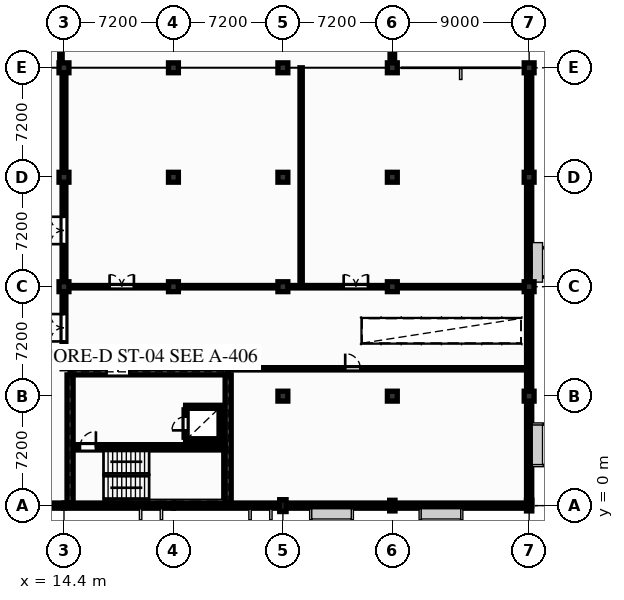
"""IFC4 building model, lengths in metres.
Left out: names, types, materials, properties, quantities, classifications, styles, units other than length and angle.
Written with IfcOpenShell. Run it as: python <this file> out.ifc"""

import sys

from ifc_helpers import new_model, si_unit, direction, frame, frame_2d, origin, origin_2d, place, context, subcontext, project, spatial, rectangle, extrude, element, fill, save


model = new_model("IFC4")
c1 = context("Model", 3, precision=1e-05, world=origin(), true_north=direction((0.0, 1.0)))
c2 = subcontext(c1, "Body", "Model", "MODEL_VIEW")
j1 = project(units=[si_unit("LENGTHUNIT", "METRE"), si_unit("PLANEANGLEUNIT", "RADIAN")], contexts=[c1])
p1 = place(None, origin())
s1 = spatial("IfcSite", under=j1, at=p1, CompositionType="ELEMENT")
p2 = place(p1, origin())
s2 = spatial("IfcBuilding", under=s1, at=p2, CompositionType="ELEMENT")
p3 = place(p2, frame((0.0, 0.0, 5.1)))
s3 = spatial("IfcBuildingStorey", under=s2, at=p3, CompositionType="ELEMENT", Elevation=5.1)
for number, where, z_axis, x_axis in (
    (1, (14.4, 14.4, 0.0), (0.0, 0.0, 1.0), (1.0, 0.0, 0.0)),
    (2, (14.4, 21.6, 0.0), (0.0, 0.0, 1.0), (1.0, 0.0, 0.0)),
    (3, (14.4, 28.8, 0.0), (0.0, 0.0, 1.0), (1.0, 0.0, 0.0)),
    (4, (21.6, 14.4, 0.0), (0.0, 0.0, 1.0), (1.0, 0.0, 0.0)),
    (5, (21.6, 21.6, 0.0), (0.0, 0.0, 1.0), (1.0, 0.0, 0.0)),
    (6, (21.6, 28.8, 0.0), (0.0, 0.0, 1.0), (1.0, 0.0, 0.0)),
):
    element("IfcColumn", number, at=place(p3, frame(where, z_axis=z_axis, x_axis=x_axis)), inside=s3, PredefinedType="COLUMN", context=c2, shape_type="SweptSolid", body=[
        extrude(rectangle(XDim=0.65, YDim=0.65, at=origin_2d()), origin(), (0.0, 0.0, 1.0), 3.84),
    ])
p4 = place(p3, frame((28.8, 0.0, 0.0), z_axis=(0.0, 0.0, 1.0), x_axis=(0.0, 1.0, 0.0)))
e7 = element("IfcColumn", 7, at=p4, inside=s3, PredefinedType="PILASTER", context=c2, shape_type="SweptSolid", body=[
    extrude(rectangle(XDim=0.42, YDim=0.78, at=origin_2d()), origin(), (0.0, 0.0, 1.0), 3.84),
])
for number, where, z_axis, x_axis in (
    (8, (28.8, 7.2, 0.0), (0.0, 0.0, 1.0), (1.0, 0.0, 0.0)),
    (9, (28.8, 14.4, 0.0), (0.0, 0.0, 1.0), (1.0, 0.0, 0.0)),
    (10, (28.8, 21.6, 0.0), (0.0, 0.0, 1.0), (1.0, 0.0, 0.0)),
    (11, (28.8, 28.8, 0.0), (0.0, 0.0, 1.0), (1.0, 0.0, 0.0)),
):
    element("IfcColumn", number, at=place(p3, frame(where, z_axis=z_axis, x_axis=x_axis)), inside=s3, PredefinedType="COLUMN", context=c2, shape_type="SweptSolid", body=[
        extrude(rectangle(XDim=0.65, YDim=0.65, at=origin_2d()), origin(), (0.0, 0.0, 1.0), 3.84),
    ])
p5 = place(p3, frame((36.0, 0.0, 0.0), z_axis=(0.0, 0.0, 1.0), x_axis=(0.0, 1.0, 0.0)))
e12 = element("IfcColumn", 12, at=p5, inside=s3, PredefinedType="PILASTER", context=c2, shape_type="SweptSolid", body=[
    extrude(rectangle(XDim=0.35, YDim=0.7, at=origin_2d()), origin(), (0.0, 0.0, 1.0), 3.84),
])
for number, where, z_axis, x_axis in (
    (13, (36.0, 7.2, 0.0), (0.0, 0.0, 1.0), (1.0, 0.0, 0.0)),
    (14, (36.0, 14.4, 0.0), (0.0, 0.0, 1.0), (1.0, 0.0, 0.0)),
    (15, (36.0, 21.6, 0.0), (0.0, 0.0, 1.0), (1.0, 0.0, 0.0)),
    (16, (36.0, 28.8, 0.0), (0.0, 0.0, 1.0), (1.0, 0.0, 0.0)),
):
    element("IfcColumn", number, at=place(p3, frame(where, z_axis=z_axis, x_axis=x_axis)), inside=s3, PredefinedType="COLUMN", context=c2, shape_type="SweptSolid", body=[
        extrude(rectangle(XDim=0.65, YDim=0.65, at=origin_2d()), origin(), (0.0, 0.0, 1.0), 3.84),
    ])
p6 = place(p3, frame((45.0, 0.0, 0.0), z_axis=(0.0, 0.0, 1.0), x_axis=(0.0, 1.0, 0.0)))
e17 = element("IfcColumn", 17, at=p6, inside=s3, PredefinedType="PILASTER", context=c2, shape_type="SweptSolid", body=[
    extrude(rectangle(XDim=0.35, YDim=0.7, at=origin_2d()), origin(), (0.0, 0.0, 1.0), 3.84),
])
for number, where, z_axis, x_axis in (
    (18, (45.0, 7.2, 0.0), (0.0, 0.0, 1.0), (1.0, 0.0, 0.0)),
    (19, (45.0, 14.4, 0.0), (0.0, 0.0, 1.0), (1.0, 0.0, 0.0)),
    (20, (45.0, 21.6, 0.0), (0.0, 0.0, 1.0), (1.0, 0.0, 0.0)),
    (21, (45.0, 28.8, 0.0), (0.0, 0.0, 1.0), (1.0, 0.0, 0.0)),
):
    element("IfcColumn", number, at=place(p3, frame(where, z_axis=z_axis, x_axis=x_axis)), inside=s3, PredefinedType="COLUMN", context=c2, shape_type="SweptSolid", body=[
        extrude(rectangle(XDim=0.65, YDim=0.65, at=origin_2d()), origin(), (0.0, 0.0, 1.0), 3.84),
    ])
p7 = place(p3, frame((36.0, 28.8, 0.0), z_axis=(0.0, 0.0, 1.0), x_axis=(0.0, 1.0, 0.0)))
e22 = element("IfcWall", 22, at=p7, inside=s3, PredefinedType="SOLIDWALL", context=c2, shape_type="SweptSolid", body=[
    extrude(rectangle(XDim=7.2, YDim=0.3, at=frame_2d((3.6, 0.0))), origin(), (0.0, 0.0, 1.0), 3.117),
])
p8 = place(p7, frame((1.6, 0.0, 0.85)))
e23 = element("IfcOpeningElement", 23, at=p8, cuts=e22, PredefinedType="OPENING", context=c2, shape_type="SweptSolid", body=[
    extrude(rectangle(XDim=1.95, YDim=2.1, at=frame_2d((0.975, 1.05))), frame((0.0, 0.16, 0.0), z_axis=(0.0, -1.0, 0.0), x_axis=(1.0, 0.0, 0.0)), (0.0, 0.0, 1.0), 0.32),
])
p9 = place(p7, frame((4.5, 0.0, 0.85)))
e24 = element("IfcOpeningElement", 24, at=p9, cuts=e22, PredefinedType="OPENING", context=c2, shape_type="SweptSolid", body=[
    extrude(rectangle(XDim=1.6, YDim=2.05, at=frame_2d((0.8, 1.025))), frame((0.0, 0.16, 0.0), z_axis=(0.0, -1.0, 0.0), x_axis=(1.0, 0.0, 0.0)), (0.0, 0.0, 1.0), 0.32),
])
p10 = place(p3, frame((7.2, 0.0, 0.0), z_axis=(0.0, 0.0, 1.0), x_axis=(1.0, 0.0, 0.0)))
e25 = element("IfcWall", 25, at=p10, inside=s3, PredefinedType="SOLIDWALL", context=c2, shape_type="SweptSolid", body=[
    extrude(rectangle(XDim=7.2, YDim=0.34, at=frame_2d((3.6, 0.0))), origin(), (0.0, 0.0, 1.0), 3.55),
])
p11 = place(p10, frame((2.0, 0.0, 0.85)))
e26 = element("IfcOpeningElement", 26, at=p11, cuts=e25, PredefinedType="OPENING", context=c2, shape_type="SweptSolid", body=[
    extrude(rectangle(XDim=2.4, YDim=2.4, at=frame_2d((1.2, 1.2))), frame((0.0, 0.18, 0.0), z_axis=(0.0, -1.0, 0.0), x_axis=(1.0, 0.0, 0.0)), (0.0, 0.0, 1.0), 0.36),
])
p12 = place(p3, frame((14.4, 0.0, 0.0), z_axis=(0.0, 0.0, 1.0), x_axis=(1.0, 0.0, 0.0)))
e27 = element("IfcWall", 27, at=p12, inside=s3, PredefinedType="SOLIDWALL", context=c2, shape_type="SweptSolid", body=[
    extrude(rectangle(XDim=7.2, YDim=0.34, at=frame_2d((3.6, 0.0))), origin(), (0.0, 0.0, 1.0), 3.55),
])
p13 = place(p12, frame((5.2, 0.0, 1.05)))
e28 = element("IfcOpeningElement", 28, at=p13, cuts=e27, PredefinedType="OPENING", context=c2, shape_type="SweptSolid", body=[
    extrude(rectangle(XDim=1.05, YDim=1.75, at=frame_2d((0.525, 0.875))), frame((0.0, 0.18, 0.0), z_axis=(0.0, -1.0, 0.0), x_axis=(1.0, 0.0, 0.0)), (0.0, 0.0, 1.0), 0.36),
])
p14 = place(p3, frame((21.6, 0.0, 0.0), z_axis=(0.0, 0.0, 1.0), x_axis=(1.0, 0.0, 0.0)))
e29 = element("IfcWall", 29, at=p14, inside=s3, PredefinedType="SOLIDWALL", context=c2, shape_type="SweptSolid", body=[
    extrude(rectangle(XDim=7.2, YDim=0.34, at=frame_2d((3.6, 0.0))), origin(), (0.0, 0.0, 1.0), 3.55),
])
p15 = place(p14, frame((5.2, 0.0, 1.05)))
e30 = element("IfcOpeningElement", 30, at=p15, cuts=e29, PredefinedType="OPENING", context=c2, shape_type="SweptSolid", body=[
    extrude(rectangle(XDim=1.05, YDim=1.75, at=frame_2d((0.525, 0.875))), frame((0.0, 0.18, 0.0), z_axis=(0.0, -1.0, 0.0), x_axis=(1.0, 0.0, 0.0)), (0.0, 0.0, 1.0), 0.36),
])
p16 = place(p3, frame((28.8, 0.0, 0.0), z_axis=(0.0, 0.0, 1.0), x_axis=(1.0, 0.0, 0.0)))
e31 = element("IfcWall", 31, at=p16, inside=s3, PredefinedType="SOLIDWALL", context=c2, shape_type="SweptSolid", body=[
    extrude(rectangle(XDim=7.2, YDim=0.34, at=frame_2d((3.6, 0.0))), origin(), (0.0, 0.0, 1.0), 3.55),
])
p17 = place(p16, frame((2.0, 0.0, 0.435)))
e32 = element("IfcOpeningElement", 32, at=p17, cuts=e31, PredefinedType="OPENING", context=c2, shape_type="SweptSolid", body=[
    extrude(rectangle(XDim=2.4, YDim=2.4, at=frame_2d((1.2, 1.2))), frame((0.0, 0.18, 0.0), z_axis=(0.0, -1.0, 0.0), x_axis=(1.0, 0.0, 0.0)), (0.0, 0.0, 1.0), 0.36),
])
p18 = place(p3, frame((36.0, 0.0, 0.0), z_axis=(0.0, 0.0, 1.0), x_axis=(1.0, 0.0, 0.0)))
e33 = element("IfcWall", 33, at=p18, inside=s3, PredefinedType="SOLIDWALL", context=c2, shape_type="SweptSolid", body=[
    extrude(rectangle(XDim=9.0, YDim=0.34, at=frame_2d((4.5, 0.0))), origin(), (0.0, 0.0, 1.0), 3.55),
])
p19 = place(p18, frame((2.0, 0.0, 0.375)))
e34 = element("IfcOpeningElement", 34, at=p19, cuts=e33, PredefinedType="OPENING", context=c2, shape_type="SweptSolid", body=[
    extrude(rectangle(XDim=2.4, YDim=2.4, at=frame_2d((1.2, 1.2))), frame((0.0, 0.18, 0.0), z_axis=(0.0, -1.0, 0.0), x_axis=(1.0, 0.0, 0.0)), (0.0, 0.0, 1.0), 0.36),
])
p20 = place(p3, frame((45.0, 0.0, 0.0), z_axis=(0.0, 0.0, 1.0), x_axis=(0.0, 1.0, 0.0)))
e35 = element("IfcWall", 35, at=p20, inside=s3, PredefinedType="SOLIDWALL", context=c2, shape_type="SweptSolid", body=[
    extrude(rectangle(XDim=28.8, YDim=0.34, at=frame_2d((14.4, 0.0))), origin(), (0.0, 0.0, 1.0), 3.55),
])
p21 = place(p20, frame((2.8, 0.0, 0.255)))
e36 = element("IfcOpeningElement", 36, at=p21, cuts=e35, PredefinedType="OPENING", context=c2, shape_type="SweptSolid", body=[
    extrude(rectangle(XDim=2.4, YDim=2.4, at=frame_2d((1.2, 1.2))), frame((0.0, 0.18, 0.0), z_axis=(0.0, -1.0, 0.0), x_axis=(1.0, 0.0, 0.0)), (0.0, 0.0, 1.0), 0.36),
])
p22 = place(p20, frame((15.2, 0.0, 0.605)))
e37 = element("IfcOpeningElement", 37, at=p22, cuts=e35, PredefinedType="OPENING", context=c2, shape_type="SweptSolid", body=[
    extrude(rectangle(XDim=1.6, YDim=2.05, at=frame_2d((0.8, 1.025))), frame((0.0, 0.18, 0.0), z_axis=(0.0, -1.0, 0.0), x_axis=(1.0, 0.0, 0.0)), (0.0, 0.0, 1.0), 0.36),
])
p23 = place(p3, frame((14.8, 8.8, 0.0), z_axis=(0.0, 0.0, 1.0), x_axis=(1.0, 0.0, 0.0)))
e38 = element("IfcWall", 38, at=p23, inside=s3, PredefinedType="SHEAR", context=c2, shape_type="SweptSolid", body=[
    extrude(rectangle(XDim=10.4, YDim=0.4, at=frame_2d((5.2, 0.0))), origin(), (0.0, 0.0, 1.0), 3.55),
])
p24 = place(p23, frame((2.4, 0.0, 0.0)))
e39 = element("IfcOpeningElement", 39, at=p24, cuts=e38, PredefinedType="OPENING", context=c2, shape_type="SweptSolid", body=[
    extrude(rectangle(XDim=1.5, YDim=2.2, at=frame_2d((0.75, 1.1))), frame((0.0, 0.21, 0.0), z_axis=(0.0, -1.0, 0.0), x_axis=(1.0, 0.0, 0.0)), (0.0, 0.0, 1.0), 0.42),
])
for number, where, z_axis, x_axis in (
    (40, (14.8, 0.17, 0.0), (0.0, 0.0, 1.0), (0.0, 1.0, 0.0)),
    (41, (25.2, 0.17, 0.0), (0.0, 0.0, 1.0), (0.0, 1.0, 0.0)),
):
    element("IfcWall", number, at=place(p3, frame(where, z_axis=z_axis, x_axis=x_axis)), inside=s3, PredefinedType="SHEAR", context=c2, shape_type="SweptSolid", body=[
        extrude(rectangle(XDim=8.43, YDim=0.4, at=frame_2d((4.215, 0.0))), origin(), (0.0, 0.0, 1.0), 3.55),
    ])
p25 = place(p3, frame((15.0, 3.835, 0.0), z_axis=(0.0, 0.0, 1.0), x_axis=(1.0, 0.0, 0.0)))
e42 = element("IfcWall", 42, at=p25, inside=s3, PredefinedType="SHEAR", context=c2, shape_type="SweptSolid", body=[
    extrude(rectangle(XDim=10.0, YDim=0.35, at=frame_2d((5.0, 0.0))), origin(), (0.0, 0.0, 1.0), 3.55),
])
p26 = place(p25, frame((0.45, 0.0, 0.0)))
e43 = element("IfcOpeningElement", 43, at=p26, cuts=e42, PredefinedType="OPENING", context=c2, shape_type="SweptSolid", body=[
    extrude(rectangle(XDim=1.05, YDim=2.2, at=frame_2d((0.525, 1.1))), frame((0.0, 0.185, 0.0), z_axis=(0.0, -1.0, 0.0), x_axis=(1.0, 0.0, 0.0)), (0.0, 0.0, 1.0), 0.37),
])
for number, where, z_axis, x_axis in (
    (44, (22.4, 4.3, 0.0), (0.0, 0.0, 1.0), (1.0, 0.0, 0.0)),
    (45, (22.4, 6.5, 0.0), (0.0, 0.0, 1.0), (1.0, 0.0, 0.0)),
):
    element("IfcWall", number, at=place(p3, frame(where, z_axis=z_axis, x_axis=x_axis)), inside=s3, PredefinedType="PARTITIONING", context=c2, shape_type="SweptSolid", body=[
        extrude(rectangle(XDim=2.3, YDim=0.2, at=frame_2d((1.15, 0.0))), origin(), (0.0, 0.0, 1.0), 3.55),
    ])
p27 = place(p3, frame((22.4, 4.5, 0.0), z_axis=(0.0, 0.0, 1.0), x_axis=(0.0, 1.0, 0.0)))
e46 = element("IfcWall", 46, at=p27, inside=s3, PredefinedType="PARTITIONING", context=c2, shape_type="SweptSolid", body=[
    extrude(rectangle(XDim=1.8, YDim=0.2, at=frame_2d((0.9, 0.0))), origin(), (0.0, 0.0, 1.0), 3.55),
])
p28 = place(p27, frame((0.45, 0.0, 0.0)))
e47 = element("IfcOpeningElement", 47, at=p28, cuts=e46, PredefinedType="OPENING", context=c2, shape_type="SweptSolid", body=[
    extrude(rectangle(XDim=0.9, YDim=2.1, at=frame_2d((0.45, 1.05))), frame((0.0, 0.11, 0.0), z_axis=(0.0, -1.0, 0.0), x_axis=(1.0, 0.0, 0.0)), (0.0, 0.0, 1.0), 0.22),
])
p29 = place(p3, frame((24.7, 4.5, 0.0), z_axis=(0.0, 0.0, 1.0), x_axis=(0.0, 1.0, 0.0)))
e48 = element("IfcWall", 48, at=p29, inside=s3, PredefinedType="PARTITIONING", context=c2, shape_type="SweptSolid", body=[
    extrude(rectangle(XDim=1.8, YDim=0.2, at=frame_2d((0.9, 0.0))), origin(), (0.0, 0.0, 1.0), 3.55),
])
p30 = place(p3, frame((14.2, 28.8, 0.0), z_axis=(0.0, 0.0, 1.0), x_axis=(0.0, 1.0, 0.0)))
e49 = element("IfcWall", 49, at=p30, inside=s3, PredefinedType="PARTITIONING", context=c2, shape_type="SweptSolid", body=[
    extrude(rectangle(XDim=14.32, YDim=0.16, at=frame_2d((7.16, 0.0))), origin(), (0.0, 0.0, 1.0), 2.943),
])
p31 = place(p30, frame((4.5, 0.0, 0.0)))
e50 = element("IfcOpeningElement", 50, at=p31, cuts=e49, PredefinedType="OPENING", context=c2, shape_type="SweptSolid", body=[
    extrude(rectangle(XDim=1.6, YDim=2.2, at=frame_2d((0.8, 1.1))), frame((0.0, 0.09, 0.0), z_axis=(0.0, -1.0, 0.0), x_axis=(1.0, 0.0, 0.0)), (0.0, 0.0, 1.0), 0.18),
])
p32 = place(p3, frame((14.4, 9.0, 0.0), z_axis=(0.0, 0.0, 1.0), x_axis=(0.0, 1.0, 0.0)))
e51 = element("IfcWall", 51, at=p32, inside=s3, PredefinedType="PARTITIONING", context=c2, shape_type="SweptSolid", body=[
    extrude(rectangle(XDim=19.8, YDim=0.25, at=frame_2d((9.9, 0.0))), origin(), (0.0, 0.0, 1.0), 2.755),
])
p33 = place(p32, frame((1.8, 0.0, 0.0)))
e52 = element("IfcOpeningElement", 52, at=p33, cuts=e51, PredefinedType="OPENING", context=c2, shape_type="SweptSolid", body=[
    extrude(rectangle(XDim=1.8, YDim=2.3, at=frame_2d((0.9, 1.15))), frame((0.0, 0.135, 0.0), z_axis=(0.0, -1.0, 0.0), x_axis=(1.0, 0.0, 0.0)), (0.0, 0.0, 1.0), 0.27),
])
p34 = place(p32, frame((8.2, 0.0, 0.0)))
e53 = element("IfcOpeningElement", 53, at=p34, cuts=e51, PredefinedType="OPENING", context=c2, shape_type="SweptSolid", body=[
    extrude(rectangle(XDim=1.8, YDim=2.3, at=frame_2d((0.9, 1.15))), frame((0.0, 0.135, 0.0), z_axis=(0.0, -1.0, 0.0), x_axis=(1.0, 0.0, 0.0)), (0.0, 0.0, 1.0), 0.27),
])
p35 = place(p3, frame((14.6, 14.4, 0.0), z_axis=(0.0, 0.0, 1.0), x_axis=(1.0, 0.0, 0.0)))
e54 = element("IfcWall", 54, at=p35, inside=s3, PredefinedType="PARTITIONING", context=c2, shape_type="SweptSolid", body=[
    extrude(rectangle(XDim=30.4, YDim=0.16, at=frame_2d((15.2, 0.0))), origin(), (0.0, 0.0, 1.0), 2.675),
])
p36 = place(p35, frame((2.8, 0.0, 0.0)))
e55 = element("IfcOpeningElement", 55, at=p36, cuts=e54, PredefinedType="OPENING", context=c2, shape_type="SweptSolid", body=[
    extrude(rectangle(XDim=1.6, YDim=2.2, at=frame_2d((0.8, 1.1))), frame((0.0, 0.09, 0.0), z_axis=(0.0, -1.0, 0.0), x_axis=(1.0, 0.0, 0.0)), (0.0, 0.0, 1.0), 0.18),
])
p37 = place(p35, frame((18.2, 0.0, 0.0)))
e56 = element("IfcOpeningElement", 56, at=p37, cuts=e54, PredefinedType="OPENING", context=c2, shape_type="SweptSolid", body=[
    extrude(rectangle(XDim=1.6, YDim=2.2, at=frame_2d((0.8, 1.1))), frame((0.0, 0.09, 0.0), z_axis=(0.0, -1.0, 0.0), x_axis=(1.0, 0.0, 0.0)), (0.0, 0.0, 1.0), 0.18),
])
p38 = place(p3, frame((30.0, 14.4, 0.0), z_axis=(0.0, 0.0, 1.0), x_axis=(0.0, 1.0, 0.0)))
e57 = element("IfcWall", 57, at=p38, inside=s3, PredefinedType="PARTITIONING", context=c2, shape_type="SweptSolid", body=[
    extrude(rectangle(XDim=14.4, YDim=0.15, at=frame_2d((7.2, 0.0))), origin(), (0.0, 0.0, 1.0), 3.55),
])
p39 = place(p3, frame((25.4, 9.0, 0.0), z_axis=(0.0, 0.0, 1.0), x_axis=(1.0, 0.0, 0.0)))
e58 = element("IfcWall", 58, at=p39, inside=s3, PredefinedType="PARTITIONING", context=c2, shape_type="SweptSolid", body=[
    extrude(rectangle(XDim=19.6, YDim=0.15, at=frame_2d((9.8, 0.0))), origin(), (0.0, 0.0, 1.0), 3.55),
])
p40 = place(p39, frame((7.5, 0.0, 0.0)))
e59 = element("IfcOpeningElement", 59, at=p40, cuts=e58, PredefinedType="OPENING", context=c2, shape_type="SweptSolid", body=[
    extrude(rectangle(XDim=1.0, YDim=2.15, at=frame_2d((0.5, 1.075))), frame((0.0, 0.085, 0.0), z_axis=(0.0, -1.0, 0.0), x_axis=(1.0, 0.0, 0.0)), (0.0, 0.0, 1.0), 0.17),
])
p41 = place(p13, origin())
e60 = element("IfcWindow", 60, at=p41, inside=s3, PartitioningType="SINGLE_PANEL", PredefinedType="WINDOW", context=c2, shape_type="SweptSolid", body=[
    extrude(rectangle(XDim=1.05, YDim=1.75, at=frame_2d((0.525, 0.875))), frame((0.0, 0.03, 0.0), z_axis=(0.0, -1.0, 0.0), x_axis=(1.0, 0.0, 0.0)), (0.0, 0.0, 1.0), 0.06),
])
fill(e28, e60)
p42 = place(p15, origin())
e61 = element("IfcWindow", 61, at=p42, inside=s3, PartitioningType="SINGLE_PANEL", PredefinedType="WINDOW", context=c2, shape_type="SweptSolid", body=[
    extrude(rectangle(XDim=1.05, YDim=1.75, at=frame_2d((0.525, 0.875))), frame((0.0, 0.03, 0.0), z_axis=(0.0, -1.0, 0.0), x_axis=(1.0, 0.0, 0.0)), (0.0, 0.0, 1.0), 0.06),
])
fill(e30, e61)
p43 = place(p17, origin())
e62 = element("IfcWindow", 62, at=p43, inside=s3, PartitioningType="SINGLE_PANEL", PredefinedType="WINDOW", context=c2, shape_type="SweptSolid", body=[
    extrude(rectangle(XDim=2.4, YDim=2.4, at=frame_2d((1.2, 1.2))), frame((0.0, 0.03, 0.0), z_axis=(0.0, -1.0, 0.0), x_axis=(1.0, 0.0, 0.0)), (0.0, 0.0, 1.0), 0.06),
])
fill(e32, e62)
p44 = place(p19, origin())
e63 = element("IfcWindow", 63, at=p44, inside=s3, PartitioningType="SINGLE_PANEL", PredefinedType="WINDOW", context=c2, shape_type="SweptSolid", body=[
    extrude(rectangle(XDim=2.4, YDim=2.4, at=frame_2d((1.2, 1.2))), frame((0.0, 0.03, 0.0), z_axis=(0.0, -1.0, 0.0), x_axis=(1.0, 0.0, 0.0)), (0.0, 0.0, 1.0), 0.06),
])
fill(e34, e63)
p45 = place(p21, origin())
e64 = element("IfcWindow", 64, at=p45, inside=s3, PartitioningType="SINGLE_PANEL", PredefinedType="WINDOW", context=c2, shape_type="SweptSolid", body=[
    extrude(rectangle(XDim=2.4, YDim=2.4, at=frame_2d((1.2, 1.2))), frame((0.0, 0.03, 0.0), z_axis=(0.0, -1.0, 0.0), x_axis=(1.0, 0.0, 0.0)), (0.0, 0.0, 1.0), 0.06),
])
fill(e36, e64)
p46 = place(p22, origin())
e65 = element("IfcWindow", 65, at=p46, inside=s3, PartitioningType="SINGLE_PANEL", PredefinedType="WINDOW", context=c2, shape_type="SweptSolid", body=[
    extrude(rectangle(XDim=1.6, YDim=2.05, at=frame_2d((0.8, 1.025))), frame((0.0, 0.03, 0.0), z_axis=(0.0, -1.0, 0.0), x_axis=(1.0, 0.0, 0.0)), (0.0, 0.0, 1.0), 0.06),
])
fill(e37, e65)
p47 = place(p24, origin())
e66 = element("IfcDoor", 66, at=p47, inside=s3, OperationType="DOUBLE_DOOR_SINGLE_SWING", PredefinedType="DOOR", context=c2, shape_type="SweptSolid", body=[
    extrude(rectangle(XDim=1.5, YDim=2.2, at=frame_2d((0.75, 1.1))), frame((0.0, 0.025, 0.0), z_axis=(0.0, -1.0, 0.0), x_axis=(1.0, 0.0, 0.0)), (0.0, 0.0, 1.0), 0.05),
])
fill(e39, e66)
p48 = place(p26, origin())
e67 = element("IfcDoor", 67, at=p48, inside=s3, OperationType="SINGLE_SWING_RIGHT", PredefinedType="DOOR", context=c2, shape_type="SweptSolid", body=[
    extrude(rectangle(XDim=1.05, YDim=2.2, at=frame_2d((0.525, 1.1))), frame((0.0, 0.025, 0.0), z_axis=(0.0, -1.0, 0.0), x_axis=(1.0, 0.0, 0.0)), (0.0, 0.0, 1.0), 0.05),
])
fill(e43, e67)
p49 = place(p28, origin())
e68 = element("IfcDoor", 68, at=p49, inside=s3, OperationType="SINGLE_SWING_LEFT", PredefinedType="DOOR", context=c2, shape_type="SweptSolid", body=[
    extrude(rectangle(XDim=0.9, YDim=2.1, at=frame_2d((0.45, 1.05))), frame((0.0, 0.025, 0.0), z_axis=(0.0, -1.0, 0.0), x_axis=(1.0, 0.0, 0.0)), (0.0, 0.0, 1.0), 0.05),
])
fill(e47, e68)
p50 = place(p33, origin())
e69 = element("IfcDoor", 69, at=p50, inside=s3, OperationType="DOUBLE_DOOR_SINGLE_SWING", PredefinedType="DOOR", context=c2, shape_type="SweptSolid", body=[
    extrude(rectangle(XDim=1.8, YDim=2.3, at=frame_2d((0.9, 1.15))), frame((0.0, 0.025, 0.0), z_axis=(0.0, -1.0, 0.0), x_axis=(1.0, 0.0, 0.0)), (0.0, 0.0, 1.0), 0.05),
])
fill(e52, e69)
p51 = place(p34, origin())
e70 = element("IfcDoor", 70, at=p51, inside=s3, OperationType="DOUBLE_DOOR_SINGLE_SWING", PredefinedType="DOOR", context=c2, shape_type="SweptSolid", body=[
    extrude(rectangle(XDim=1.8, YDim=2.3, at=frame_2d((0.9, 1.15))), frame((0.0, 0.025, 0.0), z_axis=(0.0, -1.0, 0.0), x_axis=(1.0, 0.0, 0.0)), (0.0, 0.0, 1.0), 0.05),
])
fill(e53, e70)
p52 = place(p36, origin())
e71 = element("IfcDoor", 71, at=p52, inside=s3, OperationType="DOUBLE_DOOR_SINGLE_SWING", PredefinedType="DOOR", context=c2, shape_type="SweptSolid", body=[
    extrude(rectangle(XDim=1.6, YDim=2.2, at=frame_2d((0.8, 1.1))), frame((0.0, 0.025, 0.0), z_axis=(0.0, -1.0, 0.0), x_axis=(1.0, 0.0, 0.0)), (0.0, 0.0, 1.0), 0.05),
])
fill(e55, e71)
p53 = place(p37, origin())
e72 = element("IfcDoor", 72, at=p53, inside=s3, OperationType="DOUBLE_DOOR_SINGLE_SWING", PredefinedType="DOOR", context=c2, shape_type="SweptSolid", body=[
    extrude(rectangle(XDim=1.6, YDim=2.2, at=frame_2d((0.8, 1.1))), frame((0.0, 0.025, 0.0), z_axis=(0.0, -1.0, 0.0), x_axis=(1.0, 0.0, 0.0)), (0.0, 0.0, 1.0), 0.05),
])
fill(e56, e72)
p54 = place(p40, origin())
e73 = element("IfcDoor", 73, at=p54, inside=s3, OperationType="SINGLE_SWING_LEFT", PredefinedType="DOOR", context=c2, shape_type="SweptSolid", body=[
    extrude(rectangle(XDim=1.0, YDim=2.15, at=frame_2d((0.5, 1.075))), frame((0.0, 0.025, 0.0), z_axis=(0.0, -1.0, 0.0), x_axis=(1.0, 0.0, 0.0)), (0.0, 0.0, 1.0), 0.05),
])
fill(e59, e73)
save(model, sys.argv[1])
